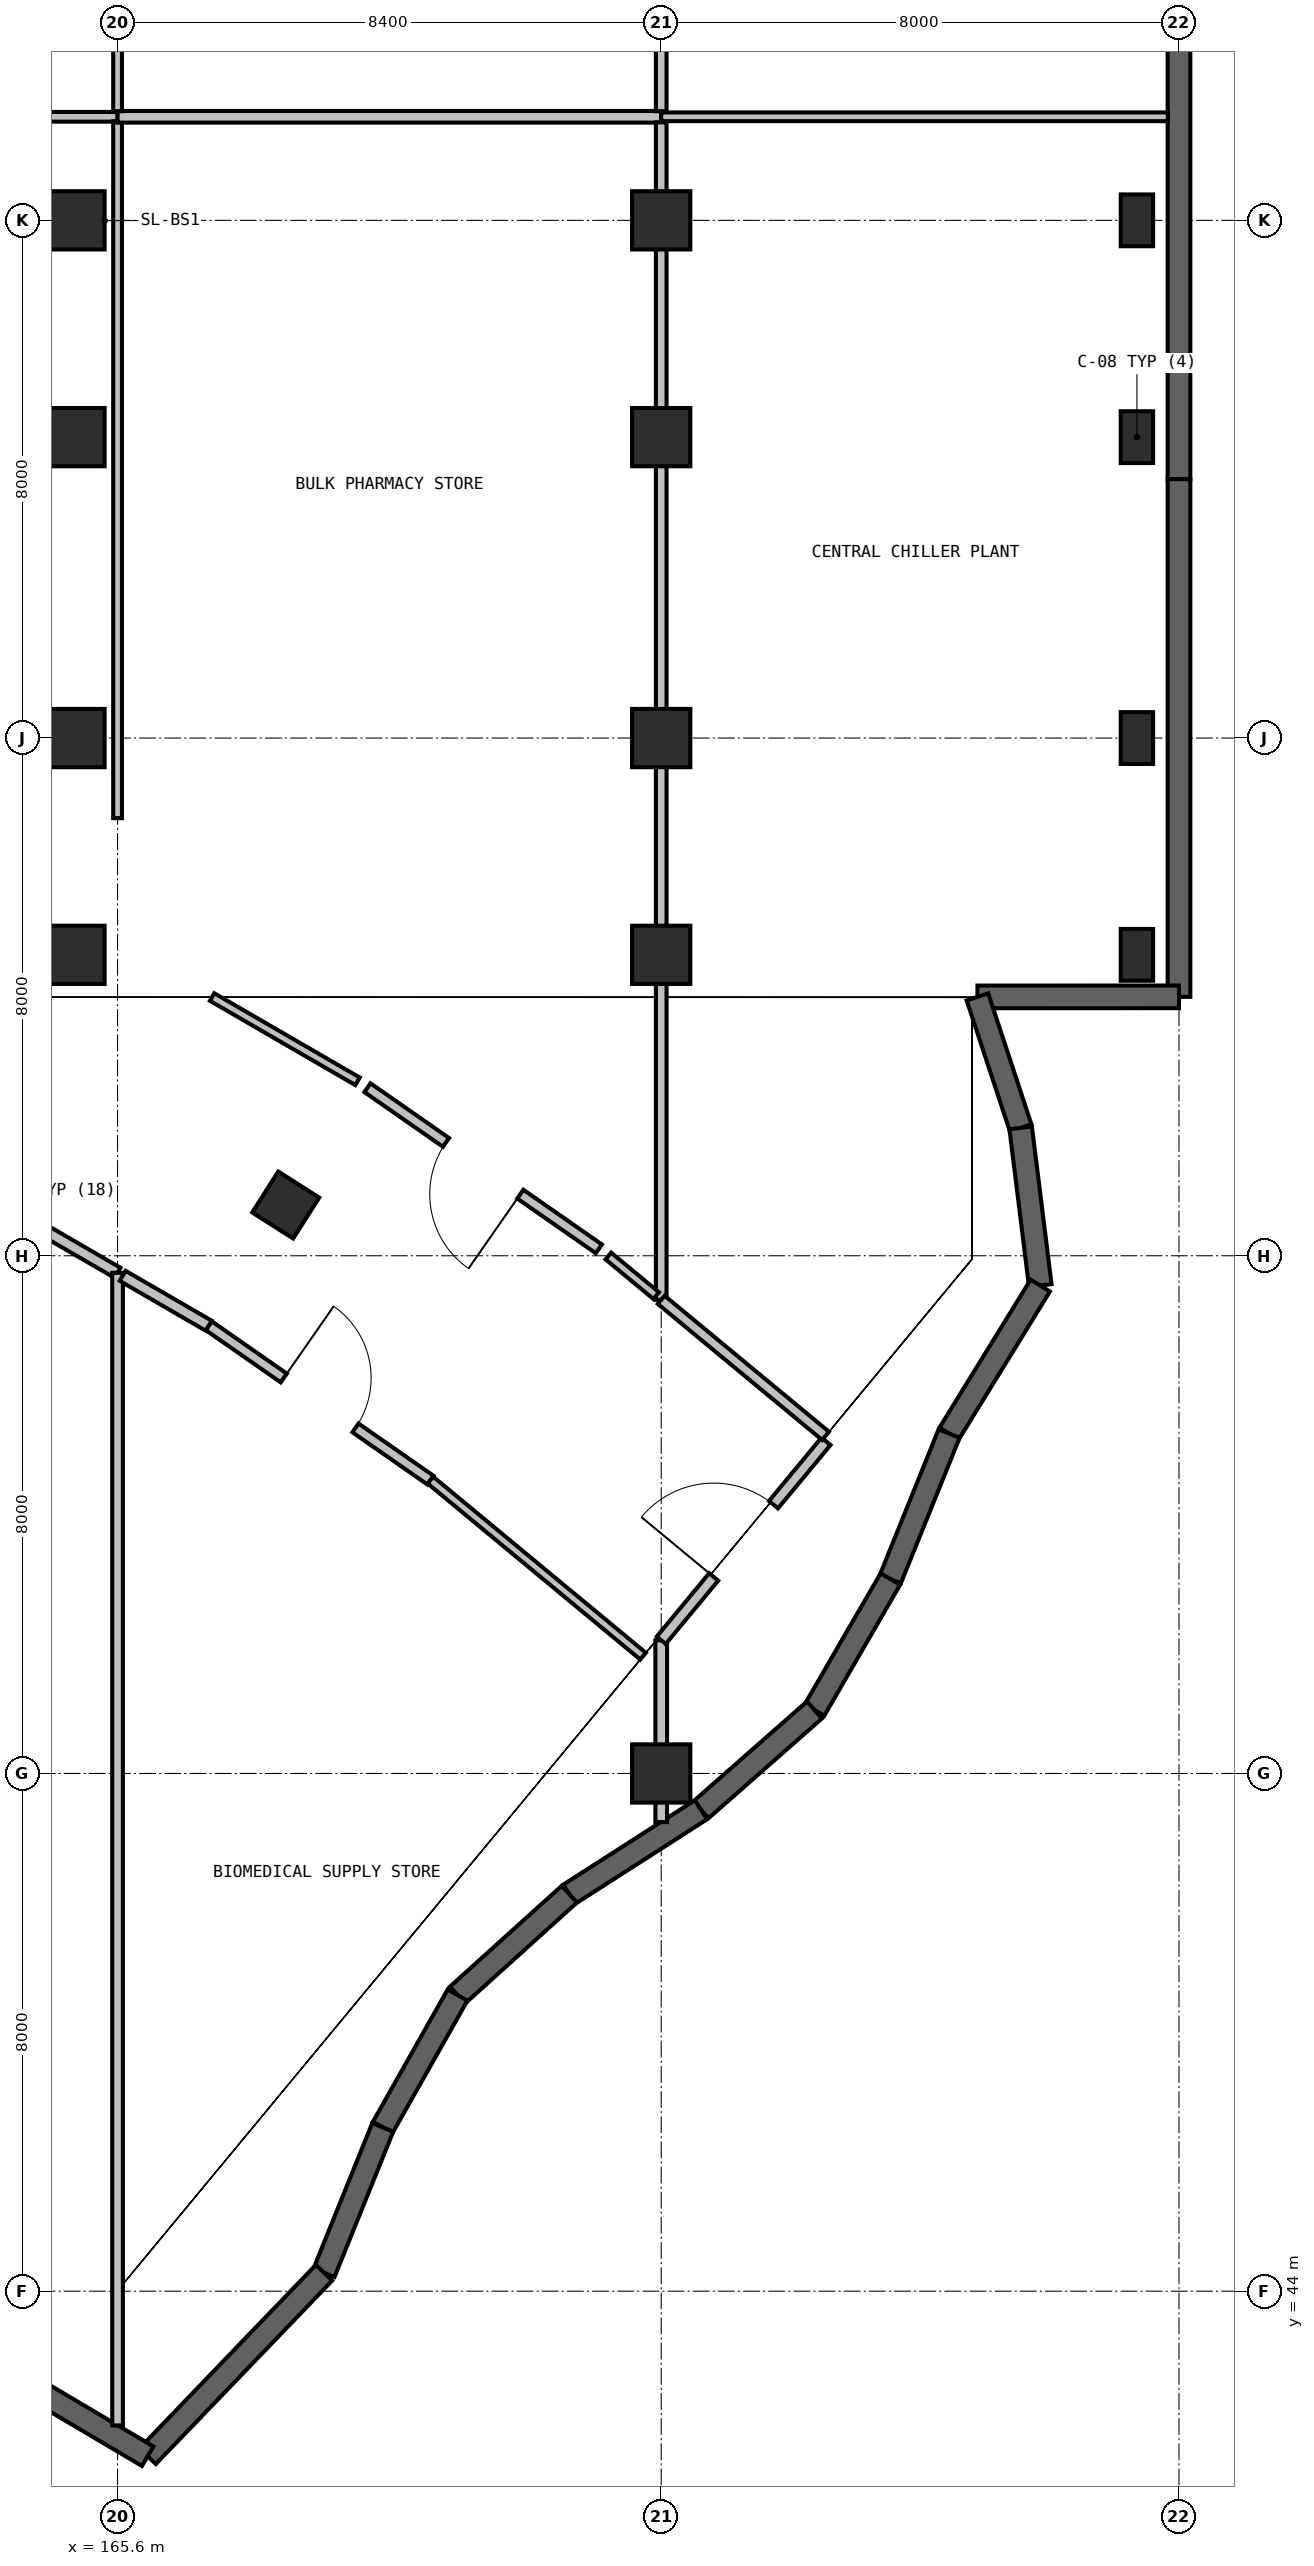
"""IFC4 building model, lengths in metres.
Left out: names, types, materials, properties, quantities, classifications, styles, units other than length and angle.
Written with IfcOpenShell. Run it as: python <this file> out.ifc"""

import sys

from ifc_helpers import new_model, si_unit, direction, frame, frame_2d, origin, origin_2d, place, context, subcontext, project, spatial, rectangle, extrude, element, fill, save


model = new_model("IFC4")
c1 = context("Model", 3, precision=1e-05, world=origin(), true_north=direction((0.0, 1.0)))
c2 = subcontext(c1, "Body", "Model", "MODEL_VIEW")
j1 = project(units=[si_unit("LENGTHUNIT", "METRE"), si_unit("PLANEANGLEUNIT", "RADIAN")], contexts=[c1])
p1 = place(None, origin())
s1 = spatial("IfcSite", under=j1, at=p1, CompositionType="ELEMENT")
p2 = place(p1, origin())
s2 = spatial("IfcBuilding", under=s1, at=p2, CompositionType="ELEMENT")
p3 = place(p2, frame((0.0, 0.0, -4.8)))
s3 = spatial("IfcBuildingStorey", under=s2, at=p3, CompositionType="ELEMENT", Elevation=-4.8)
for number, where, z_axis, x_axis in (
    (1, (164.95, 64.65, 0.0), (0.0, 0.0, 1.0), (1.0, 0.0, 0.0)),
    (2, (164.95, 68.0, 0.0), (0.0, 0.0, 1.0), (1.0, 0.0, 0.0)),
    (3, (164.95, 72.65, 0.0), (0.0, 0.0, 1.0), (1.0, 0.0, 0.0)),
    (4, (164.95, 76.0, 0.0), (0.0, 0.0, 1.0), (1.0, 0.0, 0.0)),
):
    element("IfcColumn", number, at=place(p3, frame(where, z_axis=z_axis, x_axis=x_axis)), inside=s3, PredefinedType="COLUMN", context=c2, shape_type="SweptSolid", body=[
        extrude(rectangle(XDim=0.9, YDim=0.9, at=origin_2d()), origin(), (0.0, 0.0, 1.0), 4.8),
    ])
p4 = place(p3, frame((174.0, 52.0, 0.0), z_axis=(0.0, 0.0, 1.0), x_axis=(1.0, 0.0, 0.0)))
e5 = element("IfcColumn", 5, at=p4, inside=s3, PredefinedType="COLUMN", context=c2, shape_type="SweptSolid", body=[
    extrude(rectangle(XDim=0.9, YDim=0.9, at=origin_2d()), origin(), (0.0, 0.0, 1.0), 4.565),
])
for number, where, z_axis, x_axis in (
    (6, (174.0, 64.65, 0.0), (0.0, 0.0, 1.0), (1.0, 0.0, 0.0)),
    (7, (174.0, 68.0, 0.0), (0.0, 0.0, 1.0), (1.0, 0.0, 0.0)),
    (8, (174.0, 72.65, 0.0), (0.0, 0.0, 1.0), (1.0, 0.0, 0.0)),
    (9, (174.0, 76.0, 0.0), (0.0, 0.0, 1.0), (1.0, 0.0, 0.0)),
):
    element("IfcColumn", number, at=place(p3, frame(where, z_axis=z_axis, x_axis=x_axis)), inside=s3, PredefinedType="COLUMN", context=c2, shape_type="SweptSolid", body=[
        extrude(rectangle(XDim=0.9, YDim=0.9, at=origin_2d()), origin(), (0.0, 0.0, 1.0), 4.8),
    ])
for number, where, z_axis, x_axis in (
    (10, (181.35, 64.65, 0.0), (0.0, 0.0, 1.0), (1.0, 0.0, 0.0)),
    (11, (181.35, 68.0, 0.0), (0.0, 0.0, 1.0), (1.0, 0.0, 0.0)),
    (12, (181.35, 72.65, 0.0), (0.0, 0.0, 1.0), (1.0, 0.0, 0.0)),
    (13, (181.35, 76.0, 0.0), (0.0, 0.0, 1.0), (1.0, 0.0, 0.0)),
):
    element("IfcColumn", number, at=place(p3, frame(where, z_axis=z_axis, x_axis=x_axis)), inside=s3, PredefinedType="COLUMN", context=c2, shape_type="SweptSolid", body=[
        extrude(rectangle(XDim=0.5, YDim=0.8, at=origin_2d()), origin(), (0.0, 0.0, 1.0), 4.8),
    ])
p5 = place(p3, frame((168.198, 60.784, 0.0), z_axis=(0.0, 0.0, 1.0), x_axis=(0.537064068078, 0.843541455282, 0.0)))
e14 = element("IfcColumn", 14, at=p5, inside=s3, PredefinedType="COLUMN", context=c2, shape_type="SweptSolid", body=[
    extrude(rectangle(XDim=0.75, YDim=0.75, at=origin_2d()), origin(), (0.0, 0.0, 1.0), 4.8),
])
for number, where, z_axis, x_axis in (
    (15, (182.0, 80.001, 0.0), (0.0, 0.0, 1.0), (0.0, -1.0, 0.0)),
    (16, (182.0, 72.001, 0.0), (0.0, 0.0, 1.0), (0.0, -1.0, 0.0)),
):
    element("IfcWall", number, at=place(p3, frame(where, z_axis=z_axis, x_axis=x_axis)), inside=s3, PredefinedType="SHEAR", context=c2, shape_type="SweptSolid", body=[
        extrude(rectangle(XDim=8.0, YDim=0.35, at=frame_2d((4.0, 0.0))), origin(), (0.0, 0.0, 1.0), 4.45),
    ])
p6 = place(p3, frame((182.0, 64.001, 0.0), z_axis=(0.0, 0.0, 1.0), x_axis=(-0.999999950827, -0.000313602493, 0.0)))
e17 = element("IfcWall", 17, at=p6, inside=s3, PredefinedType="SHEAR", context=c2, shape_type="SweptSolid", body=[
    extrude(rectangle(XDim=3.114, YDim=0.35, at=frame_2d((1.557, 0.0))), origin(), (0.0, 0.0, 1.0), 4.45),
])
p7 = place(p3, frame((178.886, 64.0, 0.0), z_axis=(0.0, 0.0, 1.0), x_axis=(0.313408444172, -0.949618421852, 0.0)))
e18 = element("IfcWall", 18, at=p7, inside=s3, PredefinedType="SHEAR", context=c2, shape_type="SweptSolid", body=[
    extrude(rectangle(XDim=2.131, YDim=0.35, at=frame_2d((1.066, 0.0))), origin(), (0.0, 0.0, 1.0), 4.45),
])
p8 = place(p3, frame((179.554, 61.976, 0.0), z_axis=(0.0, 0.0, 1.0), x_axis=(0.123422685037, -0.992354191213, 0.0)))
e19 = element("IfcWall", 19, at=p8, inside=s3, PredefinedType="SHEAR", context=c2, shape_type="SweptSolid", body=[
    extrude(rectangle(XDim=2.455, YDim=0.35, at=frame_2d((1.228, 0.0))), origin(), (0.0, 0.0, 1.0), 4.45),
])
p9 = place(p3, frame((179.857, 59.54, 0.0), z_axis=(0.0, 0.0, 1.0), x_axis=(-0.524335661026, -0.85151166438, 0.0)))
e20 = element("IfcWall", 20, at=p9, inside=s3, PredefinedType="SHEAR", context=c2, shape_type="SweptSolid", body=[
    extrude(rectangle(XDim=2.687, YDim=0.35, at=frame_2d((1.344, 0.0))), origin(), (0.0, 0.0, 1.0), 4.45),
])
p10 = place(p3, frame((178.448, 57.252, 0.0), z_axis=(0.0, 0.0, 1.0), x_axis=(-0.374289796273, -0.927311785974, 0.0)))
e21 = element("IfcWall", 21, at=p10, inside=s3, PredefinedType="SHEAR", context=c2, shape_type="SweptSolid", body=[
    extrude(rectangle(XDim=2.423, YDim=0.35, at=frame_2d((1.211, 0.0))), origin(), (0.0, 0.0, 1.0), 4.45),
])
p11 = place(p3, frame((177.541, 55.005, 0.0), z_axis=(0.0, 0.0, 1.0), x_axis=(-0.501468170427, -0.865176094243, 0.0)))
e22 = element("IfcWall", 22, at=p11, inside=s3, PredefinedType="SHEAR", context=c2, shape_type="SweptSolid", body=[
    extrude(rectangle(XDim=2.339, YDim=0.35, at=frame_2d((1.17, 0.0))), origin(), (0.0, 0.0, 1.0), 4.45),
])
p12 = place(p3, frame((176.368, 52.981, 0.0), z_axis=(0.0, 0.0, 1.0), x_axis=(-0.751020365123, -0.660279040384, 0.0)))
e23 = element("IfcWall", 23, at=p12, inside=s3, PredefinedType="SHEAR", context=c2, shape_type="SweptSolid", body=[
    extrude(rectangle(XDim=2.335, YDim=0.35, at=frame_2d((1.168, 0.0))), origin(), (0.0, 0.0, 1.0), 4.45),
])
p13 = place(p3, frame((174.614, 51.439, 0.0), z_axis=(0.0, 0.0, 1.0), x_axis=(-0.841667225263, -0.53999655732, 0.0)))
e24 = element("IfcWall", 24, at=p13, inside=s3, PredefinedType="SHEAR", context=c2, shape_type="SweptSolid", body=[
    extrude(rectangle(XDim=2.417, YDim=0.35, at=frame_2d((1.208, 0.0))), origin(), (0.0, 0.0, 1.0), 4.45),
])
p14 = place(p3, frame((172.58, 50.134, 0.0), z_axis=(0.0, 0.0, 1.0), x_axis=(-0.742489879853, -0.66985728205, 0.0)))
e25 = element("IfcWall", 25, at=p14, inside=s3, PredefinedType="SHEAR", context=c2, shape_type="SweptSolid", body=[
    extrude(rectangle(XDim=2.326, YDim=0.35, at=frame_2d((1.163, 0.0))), origin(), (0.0, 0.0, 1.0), 4.45),
])
p15 = place(p3, frame((170.853, 48.576, 0.0), z_axis=(0.0, 0.0, 1.0), x_axis=(-0.492115475054, -0.870529930107, 0.0)))
e26 = element("IfcWall", 26, at=p15, inside=s3, PredefinedType="SHEAR", context=c2, shape_type="SweptSolid", body=[
    extrude(rectangle(XDim=2.349, YDim=0.35, at=frame_2d((1.175, 0.0))), origin(), (0.0, 0.0, 1.0), 4.45),
])
p16 = place(p3, frame((169.697, 46.531, 0.0), z_axis=(0.0, 0.0, 1.0), x_axis=(-0.374429720213, -0.927255296356, 0.0)))
e27 = element("IfcWall", 27, at=p16, inside=s3, PredefinedType="SHEAR", context=c2, shape_type="SweptSolid", body=[
    extrude(rectangle(XDim=2.422, YDim=0.35, at=frame_2d((1.211, 0.0))), origin(), (0.0, 0.0, 1.0), 4.45),
])
p17 = place(p3, frame((168.79, 44.285, 0.0), z_axis=(0.0, 0.0, 1.0), x_axis=(-0.692999521626, -0.72093804382, 0.0)))
e28 = element("IfcWall", 28, at=p17, inside=s3, PredefinedType="SHEAR", context=c2, shape_type="SweptSolid", body=[
    extrude(rectangle(XDim=3.932, YDim=0.35, at=frame_2d((1.966, 0.0))), origin(), (0.0, 0.0, 1.0), 4.45),
])
p18 = place(p3, frame((166.065, 41.45, 0.0), z_axis=(0.0, 0.0, 1.0), x_axis=(-0.860614493438, 0.509257001606, 0.0)))
e29 = element("IfcWall", 29, at=p18, inside=s3, PredefinedType="SHEAR", context=c2, shape_type="SweptSolid", body=[
    extrude(rectangle(XDim=1.964, YDim=0.35, at=frame_2d((0.982, 0.0))), origin(), (0.0, 0.0, 1.0), 4.45),
])
p19 = place(p3, frame((163.4, 61.012, 0.0), z_axis=(0.0, 0.0, 1.0), x_axis=(0.865071180383, -0.501649133231, 0.0)))
e30 = element("IfcWall", 30, at=p19, inside=s3, PredefinedType="PARTITIONING", context=c2, shape_type="SweptSolid", body=[
    extrude(rectangle(XDim=2.543, YDim=0.18, at=frame_2d((1.272, 0.0))), origin(), (0.0, 0.0, 1.0), 4.45),
])
p20 = place(p3, frame((165.6, 59.736, 0.0), z_axis=(0.0, 0.0, 1.0), x_axis=(0.0, -1.0, 0.0)))
e31 = element("IfcWall", 31, at=p20, inside=s3, PredefinedType="PARTITIONING", context=c2, shape_type="SweptSolid", body=[
    extrude(rectangle(XDim=17.811, YDim=0.165, at=frame_2d((8.906, 0.0))), origin(), (0.0, 0.0, 1.0), 4.45),
])
p21 = place(p3, frame((162.797, 77.6, 0.0), z_axis=(0.0, 0.0, 1.0), x_axis=(1.0, 0.0, 0.0)))
e32 = element("IfcWall", 32, at=p21, inside=s3, PredefinedType="PARTITIONING", context=c2, shape_type="SweptSolid", body=[
    extrude(rectangle(XDim=2.803, YDim=0.15, at=frame_2d((1.401, 0.0))), origin(), (0.0, 0.0, 1.0), 4.45),
])
p22 = place(p3, frame((165.6, 77.529, 0.0), z_axis=(0.0, 0.0, 1.0), x_axis=(0.0, -1.0, 0.0)))
e33 = element("IfcWall", 33, at=p22, inside=s3, PredefinedType="PARTITIONING", context=c2, shape_type="SweptSolid", body=[
    extrude(rectangle(XDim=10.767, YDim=0.135, at=frame_2d((5.384, 0.0))), origin(), (0.0, 0.0, 1.0), 4.45),
])
p23 = place(p3, frame((165.678, 59.69, 0.0), z_axis=(0.0, 0.0, 1.0), x_axis=(0.865201820635, -0.501423782413, 0.0)))
e34 = element("IfcWall", 34, at=p23, inside=s3, PredefinedType="PARTITIONING", context=c2, shape_type="SweptSolid", body=[
    extrude(rectangle(XDim=1.54, YDim=0.18, at=frame_2d((0.77, 0.0))), origin(), (0.0, 0.0, 1.0), 4.45),
])
p24 = place(p3, frame((167.01, 58.918, 0.0), z_axis=(0.0, 0.0, 1.0), x_axis=(0.820562806153, -0.571556367437, 0.0)))
e35 = element("IfcWall", 35, at=p24, inside=s3, PredefinedType="PARTITIONING", context=c2, shape_type="SweptSolid", body=[
    extrude(rectangle(XDim=4.173, YDim=0.165, at=frame_2d((2.086, 0.0))), origin(), (0.0, 0.0, 1.0), 4.45),
])
p25 = place(p24, frame((1.411, 0.0, 0.0)))
e36 = element("IfcOpeningElement", 36, at=p25, cuts=e35, PredefinedType="OPENING", context=c2, shape_type="SweptSolid", body=[
    extrude(rectangle(XDim=1.35, YDim=2.15, at=frame_2d((0.675, 1.075))), frame((0.0, 0.093, 0.0), z_axis=(0.0, -1.0, 0.0), x_axis=(1.0, 0.0, 0.0)), (0.0, 0.0, 1.0), 0.185),
])
p26 = place(p3, frame((170.434, 56.533, 0.0), z_axis=(0.0, 0.0, 1.0), x_axis=(0.770230438655, -0.637765686886, 0.0)))
e37 = element("IfcWall", 37, at=p26, inside=s3, PredefinedType="PARTITIONING", context=c2, shape_type="SweptSolid", body=[
    extrude(rectangle(XDim=4.265, YDim=0.135, at=frame_2d((2.132, 0.0))), origin(), (0.0, 0.0, 1.0), 4.45),
])
p27 = place(p3, frame((174.0, 54.058, 0.0), z_axis=(0.0, 0.0, 1.0), x_axis=(0.0, -1.0, 0.0)))
e38 = element("IfcWall", 38, at=p27, inside=s3, PredefinedType="PARTITIONING", context=c2, shape_type="SweptSolid", body=[
    extrude(rectangle(XDim=2.809, YDim=0.18, at=frame_2d((1.405, 0.0))), origin(), (0.0, 0.0, 1.0), 3.7),
])
p28 = place(p3, frame((173.036, 60.107, 0.0), z_axis=(0.0, 0.0, 1.0), x_axis=(-0.820574971601, 0.571538901547, 0.0)))
e39 = element("IfcWall", 39, at=p28, inside=s3, PredefinedType="PARTITIONING", context=c2, shape_type="SweptSolid", body=[
    extrude(rectangle(XDim=4.357, YDim=0.165, at=frame_2d((2.178, 0.0))), origin(), (0.0, 0.0, 1.0), 4.45),
])
p29 = place(p28, frame((1.478, 0.0, 0.0)))
e40 = element("IfcOpeningElement", 40, at=p29, cuts=e39, PredefinedType="OPENING", context=c2, shape_type="SweptSolid", body=[
    extrude(rectangle(XDim=1.4, YDim=2.15, at=frame_2d((0.7, 1.075))), frame((0.0, 0.093, 0.0), z_axis=(0.0, -1.0, 0.0), x_axis=(1.0, 0.0, 0.0)), (0.0, 0.0, 1.0), 0.185),
])
p30 = place(p3, frame((169.307, 62.696, 0.0), z_axis=(0.0, 0.0, 1.0), x_axis=(-0.86512994763, 0.501547778097, 0.0)))
e41 = element("IfcWall", 41, at=p30, inside=s3, PredefinedType="PARTITIONING", context=c2, shape_type="SweptSolid", body=[
    extrude(rectangle(XDim=2.596, YDim=0.135, at=frame_2d((1.298, 0.0))), origin(), (0.0, 0.0, 1.0), 4.45),
])
p31 = place(p3, frame((165.6, 77.6, 0.0), z_axis=(0.0, 0.0, 1.0), x_axis=(1.0, 0.0, 0.0)))
e42 = element("IfcWall", 42, at=p31, inside=s3, PredefinedType="PARTITIONING", context=c2, shape_type="SweptSolid", body=[
    extrude(rectangle(XDim=8.4, YDim=0.18, at=frame_2d((4.2, 0.0))), origin(), (0.0, 0.0, 1.0), 4.45),
])
p32 = place(p3, frame((174.0, 77.514, 0.0), z_axis=(0.0, 0.0, 1.0), x_axis=(0.0, -1.0, 0.0)))
e43 = element("IfcWall", 43, at=p32, inside=s3, PredefinedType="PARTITIONING", context=c2, shape_type="SweptSolid", body=[
    extrude(rectangle(XDim=18.195, YDim=0.165, at=frame_2d((9.097, 0.0))), origin(), (0.0, 0.0, 1.0), 3.7),
])
p33 = place(p3, frame((173.922, 59.384, 0.0), z_axis=(0.0, 0.0, 1.0), x_axis=(-0.770157255491, 0.637854059966, 0.0)))
e44 = element("IfcWall", 44, at=p33, inside=s3, PredefinedType="PARTITIONING", context=c2, shape_type="SweptSolid", body=[
    extrude(rectangle(XDim=0.959, YDim=0.135, at=frame_2d((0.48, 0.0))), origin(), (0.0, 0.0, 1.0), 4.45),
])
p34 = place(p3, frame((174.0, 54.058, 0.0), z_axis=(0.0, 0.0, 1.0), x_axis=(0.637732910726, 0.770257576773, 0.0)))
e45 = element("IfcWall", 45, at=p34, inside=s3, PredefinedType="PARTITIONING", context=c2, shape_type="SweptSolid", body=[
    extrude(rectangle(XDim=3.992, YDim=0.18, at=frame_2d((1.996, 0.0))), origin(), (0.0, 0.0, 1.0), 4.45),
])
p35 = place(p34, frame((1.271, 0.0, 0.0)))
e46 = element("IfcOpeningElement", 46, at=p35, cuts=e45, PredefinedType="OPENING", context=c2, shape_type="SweptSolid", body=[
    extrude(rectangle(XDim=1.45, YDim=2.15, at=frame_2d((0.725, 1.075))), frame((0.0, 0.1, 0.0), z_axis=(0.0, -1.0, 0.0), x_axis=(1.0, 0.0, 0.0)), (0.0, 0.0, 1.0), 0.2),
])
p36 = place(p3, frame((176.539, 57.217, 0.0), z_axis=(0.0, 0.0, 1.0), x_axis=(-0.770281407477, 0.637704126767, 0.0)))
e47 = element("IfcWall", 47, at=p36, inside=s3, PredefinedType="PARTITIONING", context=c2, shape_type="SweptSolid", body=[
    extrude(rectangle(XDim=3.296, YDim=0.165, at=frame_2d((1.648, 0.0))), origin(), (0.0, 0.0, 1.0), 4.45),
])
p37 = place(p3, frame((174.0, 77.6, 0.0), z_axis=(0.0, 0.0, 1.0), x_axis=(1.0, 0.0, 0.0)))
e48 = element("IfcWall", 48, at=p37, inside=s3, PredefinedType="PARTITIONING", context=c2, shape_type="SweptSolid", body=[
    extrude(rectangle(XDim=7.828, YDim=0.135, at=frame_2d((3.914, 0.0))), origin(), (0.0, 0.0, 1.0), 4.45),
])
p38 = place(p3, frame((165.6, 80.893, 0.0), z_axis=(0.0, 0.0, 1.0), x_axis=(0.0, -1.0, 0.0)))
e49 = element("IfcWall", 49, at=p38, inside=s3, PredefinedType="PARTITIONING", context=c2, shape_type="SweptSolid", body=[
    extrude(rectangle(XDim=3.207, YDim=0.135, at=frame_2d((1.604, 0.0))), origin(), (0.0, 0.0, 1.0), 4.45),
])
p39 = place(p3, frame((174.0, 105.354, 0.0), z_axis=(0.0, 0.0, 1.0), x_axis=(0.0, -1.0, 0.0)))
e50 = element("IfcWall", 50, at=p39, inside=s3, PredefinedType="PARTITIONING", context=c2, shape_type="SweptSolid", body=[
    extrude(rectangle(XDim=27.668, YDim=0.165, at=frame_2d((13.834, 0.0))), origin(), (0.0, 0.0, 1.0), 3.7),
])
p40 = place(p25, origin())
e51 = element("IfcDoor", 51, at=p40, inside=s3, OperationType="SINGLE_SWING_LEFT", PredefinedType="DOOR", context=c2, shape_type="SweptSolid", body=[
    extrude(rectangle(XDim=1.35, YDim=2.15, at=frame_2d((0.675, 1.075))), frame((0.0, 0.025, 0.0), z_axis=(0.0, -1.0, 0.0), x_axis=(1.0, 0.0, 0.0)), (0.0, 0.0, 1.0), 0.05),
])
fill(e36, e51)
p41 = place(p29, origin())
e52 = element("IfcDoor", 52, at=p41, inside=s3, OperationType="SINGLE_SWING_RIGHT", PredefinedType="DOOR", context=c2, shape_type="SweptSolid", body=[
    extrude(rectangle(XDim=1.4, YDim=2.15, at=frame_2d((0.7, 1.075))), frame((0.0, 0.025, 0.0), z_axis=(0.0, -1.0, 0.0), x_axis=(1.0, 0.0, 0.0)), (0.0, 0.0, 1.0), 0.05),
])
fill(e40, e52)
p42 = place(p35, origin())
e53 = element("IfcDoor", 53, at=p42, inside=s3, OperationType="SINGLE_SWING_LEFT", PredefinedType="DOOR", context=c2, shape_type="SweptSolid", body=[
    extrude(rectangle(XDim=1.45, YDim=2.15, at=frame_2d((0.725, 1.075))), frame((0.0, 0.025, 0.0), z_axis=(0.0, -1.0, 0.0), x_axis=(1.0, 0.0, 0.0)), (0.0, 0.0, 1.0), 0.05),
])
fill(e46, e53)
save(model, sys.argv[1])
